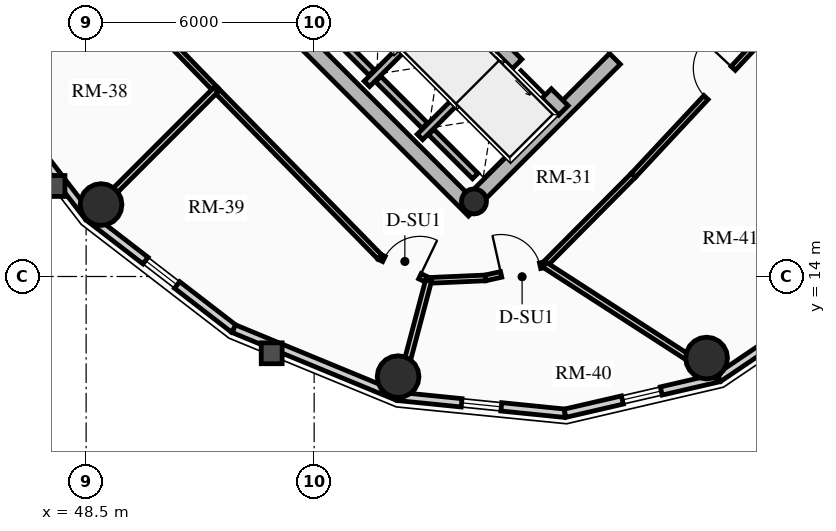
"""IFC4 building model, lengths in metres.
Left out: names, types, materials, properties, quantities, classifications, styles, units other than length and angle.
Written with IfcOpenShell. Run it as: python <this file> out.ifc"""

import sys

from ifc_helpers import new_model, si_unit, direction, frame, frame_2d, origin, origin_2d, place, context, subcontext, project, spatial, rectangle, circle, hollow_circle, extrude, source, transform, mapped, element, fill, save


model = new_model("IFC4")
c1 = context("Model", 3, precision=1e-05, world=origin(), true_north=direction((0.0, 1.0)))
c2 = subcontext(c1, "Body", "Model", "MODEL_VIEW")
j1 = project(units=[si_unit("LENGTHUNIT", "METRE"), si_unit("PLANEANGLEUNIT", "RADIAN")], contexts=[c1])
p1 = place(None, origin())
s1 = spatial("IfcSite", under=j1, at=p1, CompositionType="ELEMENT")
p2 = place(p1, origin())
s2 = spatial("IfcBuilding", under=s1, at=p2, CompositionType="ELEMENT")
p3 = place(p2, frame((0.0, 0.0, 211.21)))
s3 = spatial("IfcBuildingStorey", under=s2, at=p3, CompositionType="ELEMENT", Elevation=211.21)
p4 = place(p3, frame((58.702, 15.732, 0.0), z_axis=(0.0, 0.0, 1.0), x_axis=(-0.707106781187, 0.707106781187, 0.0)))
e1 = element("IfcWall", 1, at=p4, inside=s3, PredefinedType="SHEAR", context=c2, shape_type="SweptSolid", body=[
    extrude(rectangle(XDim=14.1, YDim=0.4, at=frame_2d((7.05, 0.0))), origin(), (0.0, 0.0, 1.0), 2.91),
])
p5 = place(p3, frame((58.561, 15.873, 0.0), z_axis=(0.0, 0.0, 1.0), x_axis=(0.707106781187, 0.707106781187, 0.0)))
e2 = element("IfcWall", 2, at=p5, inside=s3, PredefinedType="SHEAR", context=c2, shape_type="SweptSolid", body=[
    extrude(rectangle(XDim=10.7, YDim=0.4, at=frame_2d((5.35, 0.0))), origin(), (0.0, 0.0, 1.0), 2.91),
])
m1 = source(origin(), c2, "Body", "SweptSolid", [
    extrude(rectangle(XDim=1.5, YDim=2.02, at=frame_2d((0.75, 1.01))), frame((0.0, 0.21, 0.0), z_axis=(0.0, -1.0, 0.0), x_axis=(1.0, 0.0, 0.0)), (0.0, 0.0, 1.0), 0.42),
])
p6 = place(p5, frame((5.45, 0.0, 0.0)))
e3 = element("IfcOpeningElement", 3, at=p6, cuts=e2, PredefinedType="OPENING", context=c2, shape_type="MappedRepresentation", body=[
    mapped(m1, transform((0.0, 0.0, 0.0), x_axis=(1.0, 0.0, 0.0), y_axis=(0.0, 1.0, 0.0), z_axis=(0.0, 0.0, 1.0), scale=1.0)),
])
p7 = place(p3, frame((61.06, 18.373, 0.0), z_axis=(0.0, 0.0, 1.0), x_axis=(-0.707106781187, 0.707106781187, 0.0)))
e4 = element("IfcWall", 4, at=p7, inside=s3, PredefinedType="SHEAR", context=c2, shape_type="SweptSolid", body=[
    extrude(rectangle(XDim=13.7, YDim=0.35, at=frame_2d((6.85, 0.0))), origin(), (0.0, 0.0, 1.0), 2.91),
])
m2 = source(origin(), c2, "Body", "SweptSolid", [
    extrude(rectangle(XDim=1.1, YDim=2.015, at=frame_2d((0.55, 1.007))), frame((0.0, 0.185, 0.0), z_axis=(0.0, -1.0, 0.0), x_axis=(1.0, 0.0, 0.0)), (0.0, 0.0, 1.0), 0.37),
])
p8 = place(p7, frame((4.85, 0.0, 0.0)))
e5 = element("IfcOpeningElement", 5, at=p8, cuts=e4, PredefinedType="OPENING", context=c2, shape_type="MappedRepresentation", body=[
    mapped(m2, transform((0.0, 0.0, 0.0), x_axis=(1.0, 0.0, 0.0), y_axis=(0.0, 1.0, 0.0), z_axis=(0.0, 0.0, 1.0), scale=1.0)),
])
p9 = place(p7, frame((0.625, 0.0, 0.0)))
e6 = element("IfcOpeningElement", 6, at=p9, cuts=e4, PredefinedType="OPENING", context=c2, shape_type="MappedRepresentation", body=[
    mapped(m2, transform((0.0, 0.0, 0.0), x_axis=(1.0, 0.0, 0.0), y_axis=(0.0, 1.0, 0.0), z_axis=(0.0, 0.0, 1.0), scale=1.0)),
])
p10 = place(p7, frame((2.625, 0.0, 0.0)))
e7 = element("IfcOpeningElement", 7, at=p10, cuts=e4, PredefinedType="OPENING", context=c2, shape_type="MappedRepresentation", body=[
    mapped(m2, transform((0.0, 0.0, 0.0), x_axis=(1.0, 0.0, 0.0), y_axis=(0.0, 1.0, 0.0), z_axis=(0.0, 0.0, 1.0), scale=1.0)),
])
m3 = source(origin(), c2, "Body", "SweptSolid", [
    extrude(rectangle(XDim=1.15, YDim=2.02, at=frame_2d((0.575, 1.01))), frame((0.0, 0.185, 0.0), z_axis=(0.0, -1.0, 0.0), x_axis=(1.0, 0.0, 0.0)), (0.0, 0.0, 1.0), 0.37),
])
p11 = place(p7, frame((7.27, 0.0, 0.0)))
e8 = element("IfcOpeningElement", 8, at=p11, cuts=e4, PredefinedType="OPENING", context=c2, shape_type="MappedRepresentation", body=[
    mapped(m3, transform((0.0, 0.0, 0.0), x_axis=(1.0, 0.0, 0.0), y_axis=(0.0, 1.0, 0.0), z_axis=(0.0, 0.0, 1.0), scale=1.0)),
])
p12 = place(p3, frame((58.706, 15.976, 0.0), z_axis=(0.0, 0.0, 1.0), x_axis=(0.707106781187, 0.707106781187, 0.0)))
e9 = element("IfcColumn", 9, at=p12, inside=s3, PredefinedType="COLUMN", context=c2, shape_type="SweptSolid", body=[
    extrude(hollow_circle(Radius=0.33, WallThickness=0.025, at=origin_2d()), origin(), (0.0, 0.0, 1.0), 2.91),
])
for number, where, z_axis, x_axis in (
    (10, (48.893, 15.893, 0.0), (0.0, 0.0, 1.0), (1.0, 0.0, 0.0)),
    (11, (56.709, 11.365, 0.0), (0.0, 0.0, 1.0), (1.0, 0.0, 0.0)),
    (12, (64.827, 11.854, 0.0), (0.0, 0.0, 1.0), (1.0, 0.0, 0.0)),
):
    element("IfcColumn", number, at=place(p3, frame(where, z_axis=z_axis, x_axis=x_axis)), inside=s3, PredefinedType="USERDEFINED", context=c2, shape_type="SweptSolid", body=[
        extrude(circle(Radius=0.55, at=origin_2d()), origin(), (0.0, 0.0, 1.0), 2.91),
    ])
p13 = place(p3, frame((48.569, 15.569, 0.0), z_axis=(0.0, 0.0, 1.0), x_axis=(-0.610523083886, 0.791998462147, 0.0)))
e13 = element("IfcWall", 13, at=p13, inside=s3, PredefinedType="SOLIDWALL", context=c2, shape_type="SweptSolid", body=[
    extrude(rectangle(XDim=4.82, YDim=0.22, at=frame_2d((2.41, 0.0))), origin(), (0.0, 0.0, 1.0), 2.322),
])
p14 = place(p3, frame((52.387, 12.626, 0.0), z_axis=(0.0, 0.0, 1.0), x_axis=(-0.791998462147, 0.610523083886, 0.0)))
e14 = element("IfcWall", 14, at=p14, inside=s3, PredefinedType="SOLIDWALL", context=c2, shape_type="SweptSolid", body=[
    extrude(rectangle(XDim=4.82, YDim=0.22, at=frame_2d((2.41, 0.0))), origin(), (0.0, 0.0, 1.0), 2.322),
])
m4 = source(origin(), c2, "Body", "SweptSolid", [
    extrude(rectangle(XDim=1.05, YDim=1.3, at=frame_2d((0.525, 0.65))), frame((0.0, 0.12, 0.0), z_axis=(0.0, -1.0, 0.0), x_axis=(1.0, 0.0, 0.0)), (0.0, 0.0, 1.0), 0.24),
])
p15 = place(p14, frame((1.885, 0.0, 0.65)))
e15 = element("IfcOpeningElement", 15, at=p15, cuts=e14, PredefinedType="OPENING", context=c2, shape_type="MappedRepresentation", body=[
    mapped(m4, transform((0.0, 0.0, 0.0), x_axis=(1.0, 0.0, 0.0), y_axis=(0.0, 1.0, 0.0), z_axis=(0.0, 0.0, 1.0), scale=1.0)),
])
p16 = place(p3, frame((56.705, 10.845, 0.0), z_axis=(0.0, 0.0, 1.0), x_axis=(-0.924447353237, 0.381309704956, 0.0)))
e16 = element("IfcWall", 16, at=p16, inside=s3, PredefinedType="SOLIDWALL", context=c2, shape_type="SweptSolid", body=[
    extrude(rectangle(XDim=4.671, YDim=0.22, at=frame_2d((2.335, 0.0))), origin(), (0.0, 0.0, 1.0), 2.322),
])
p17 = place(p3, frame((61.1, 10.401, 0.0), z_axis=(0.0, 0.0, 1.0), x_axis=(-0.994929930991, 0.100570534541, 0.0)))
e17 = element("IfcWall", 17, at=p17, inside=s3, PredefinedType="SOLIDWALL", context=c2, shape_type="SweptSolid", body=[
    extrude(rectangle(XDim=4.418, YDim=0.22, at=frame_2d((2.209, 0.0))), origin(), (0.0, 0.0, 1.0), 2.322),
])
p18 = place(p17, frame((1.684, 0.0, 0.65)))
e18 = element("IfcOpeningElement", 18, at=p18, cuts=e17, PredefinedType="OPENING", context=c2, shape_type="MappedRepresentation", body=[
    mapped(m4, transform((0.0, 0.0, 0.0), x_axis=(1.0, 0.0, 0.0), y_axis=(0.0, 1.0, 0.0), z_axis=(0.0, 0.0, 1.0), scale=1.0)),
])
p19 = place(p3, frame((65.144, 11.337, 0.0), z_axis=(0.0, 0.0, 1.0), x_axis=(-0.974249228678, -0.225473813158, 0.0)))
e19 = element("IfcWall", 19, at=p19, inside=s3, PredefinedType="SOLIDWALL", context=c2, shape_type="SweptSolid", body=[
    extrude(rectangle(XDim=4.15, YDim=0.22, at=frame_2d((2.075, 0.0))), origin(), (0.0, 0.0, 1.0), 2.322),
])
p20 = place(p19, frame((1.55, 0.0, 0.65)))
e20 = element("IfcOpeningElement", 20, at=p20, cuts=e19, PredefinedType="OPENING", context=c2, shape_type="MappedRepresentation", body=[
    mapped(m4, transform((0.0, 0.0, 0.0), x_axis=(1.0, 0.0, 0.0), y_axis=(0.0, 1.0, 0.0), z_axis=(0.0, 0.0, 1.0), scale=1.0)),
])
p21 = place(p3, frame((68.439, 13.561, 0.0), z_axis=(0.0, 0.0, 1.0), x_axis=(-0.828833723692, -0.559495003079, 0.0)))
e21 = element("IfcWall", 21, at=p21, inside=s3, PredefinedType="SOLIDWALL", context=c2, shape_type="SweptSolid", body=[
    extrude(rectangle(XDim=3.976, YDim=0.22, at=frame_2d((1.988, 0.0))), origin(), (0.0, 0.0, 1.0), 2.322),
])
p22 = place(p3, frame((55.888, 19.069, 0.0), z_axis=(0.0, 0.0, 1.0), x_axis=(0.707106781187, 0.707106781187, 0.0)))
e22 = element("IfcWall", 22, at=p22, inside=s3, PredefinedType="SHEAR", context=c2, shape_type="SweptSolid", body=[
    extrude(rectangle(XDim=2.97, YDim=0.2, at=frame_2d((1.485, 0.0))), origin(), (0.0, 0.0, 1.0), 2.91),
])
p23 = place(p3, frame((56.015, 19.366, 0.0), z_axis=(0.0, 0.0, 1.0), x_axis=(-0.707106781187, 0.707106781187, 0.0)))
e23 = element("IfcWall", 23, at=p23, inside=s3, PredefinedType="SHEAR", context=c2, shape_type="SweptSolid", body=[
    extrude(rectangle(XDim=2.44, YDim=0.2, at=frame_2d((1.22, 0.0))), origin(), (0.0, 0.0, 1.0), 2.91),
])
p24 = place(p3, frame((57.284, 17.673, 0.0), z_axis=(0.0, 0.0, 1.0), x_axis=(0.707147878904, 0.70706568108, 0.0)))
e24 = element("IfcWall", 24, at=p24, inside=s3, PredefinedType="SHEAR", context=c2, shape_type="SweptSolid", body=[
    extrude(rectangle(XDim=2.97, YDim=0.2, at=frame_2d((1.485, 0.0))), origin(), (0.0, 0.0, 1.0), 2.91),
])
p25 = place(p3, frame((57.412, 17.97, 0.0), z_axis=(0.0, 0.0, 1.0), x_axis=(-0.707106781187, 0.707106781187, 0.0)))
e25 = element("IfcWall", 25, at=p25, inside=s3, PredefinedType="SHEAR", context=c2, shape_type="SweptSolid", body=[
    extrude(rectangle(XDim=1.735, YDim=0.2, at=frame_2d((0.867, 0.0))), origin(), (0.0, 0.0, 1.0), 2.91),
])
p26 = place(p3, frame((58.737, 16.644, 0.0), z_axis=(0.0, 0.0, 1.0), x_axis=(-0.707032117043, 0.707181437447, 0.0)))
e26 = element("IfcWall", 26, at=p26, inside=s3, PredefinedType="SHEAR", context=c2, shape_type="SweptSolid", body=[
    extrude(rectangle(XDim=1.635, YDim=0.2, at=frame_2d((0.817, 0.0))), origin(), (0.0, 0.0, 1.0), 2.91),
])
p27 = place(p3, frame((47.706, 23.253, 0.0), z_axis=(0.0, 0.0, 1.0), x_axis=(0.696179266346, -0.717867974707, 0.0)))
e27 = element("IfcWall", 27, at=p27, inside=s3, PredefinedType="PARTITIONING", context=c2, shape_type="SweptSolid", body=[
    extrude(rectangle(XDim=6.045, YDim=0.15, at=frame_2d((3.022, 0.0))), origin(), (0.0, 0.0, 1.0), 2.255),
])
p28 = place(p3, frame((51.914, 18.914, 0.0), z_axis=(0.0, 0.0, 1.0), x_axis=(0.699999313799, -0.714143515465, 0.0)))
e28 = element("IfcWall", 28, at=p28, inside=s3, PredefinedType="PARTITIONING", context=c2, shape_type="SweptSolid", body=[
    extrude(rectangle(XDim=6.162, YDim=0.15, at=frame_2d((3.081, 0.0))), origin(), (0.0, 0.0, 1.0), 2.255),
])
p29 = place(p3, frame((56.227, 14.513, 0.0), z_axis=(0.0, 0.0, 1.0), x_axis=(0.901477579283, -0.432825801044, 0.0)))
e29 = element("IfcWall", 29, at=p29, inside=s3, PredefinedType="PARTITIONING", context=c2, shape_type="SweptSolid", body=[
    extrude(rectangle(XDim=1.424, YDim=0.15, at=frame_2d((0.712, 0.0))), origin(), (0.0, 0.0, 1.0), 2.255),
])
m5 = source(origin(), c2, "Body", "SweptSolid", [
    extrude(rectangle(XDim=1.05, YDim=2.015, at=frame_2d((0.525, 1.007))), frame((0.0, 0.085, 0.0), z_axis=(0.0, -1.0, 0.0), x_axis=(1.0, 0.0, 0.0)), (0.0, 0.0, 1.0), 0.17),
])
p30 = place(p29, frame((0.12, 0.0, 0.0)))
e30 = element("IfcOpeningElement", 30, at=p30, cuts=e29, PredefinedType="OPENING", context=c2, shape_type="MappedRepresentation", body=[
    mapped(m5, transform((0.0, 0.0, 0.0), x_axis=(1.0, 0.0, 0.0), y_axis=(0.0, 1.0, 0.0), z_axis=(0.0, 0.0, 1.0), scale=1.0)),
])
p31 = place(p3, frame((57.511, 13.897, 0.0), z_axis=(0.0, 0.0, 1.0), x_axis=(0.999024538494, 0.044158481476, 0.0)))
e31 = element("IfcWall", 31, at=p31, inside=s3, PredefinedType="PARTITIONING", context=c2, shape_type="SweptSolid", body=[
    extrude(rectangle(XDim=1.498, YDim=0.15, at=frame_2d((0.749, 0.0))), origin(), (0.0, 0.0, 1.0), 2.322),
])
p32 = place(p3, frame((59.008, 13.963, 0.0), z_axis=(0.0, 0.0, 1.0), x_axis=(0.976020856791, 0.21767702476, 0.0)))
e32 = element("IfcWall", 32, at=p32, inside=s3, PredefinedType="PARTITIONING", context=c2, shape_type="SweptSolid", body=[
    extrude(rectangle(XDim=1.593, YDim=0.15, at=frame_2d((0.796, 0.0))), origin(), (0.0, 0.0, 1.0), 2.255),
])
p33 = place(p32, frame((0.423, 0.0, 0.0)))
e33 = element("IfcOpeningElement", 33, at=p33, cuts=e32, PredefinedType="OPENING", context=c2, shape_type="MappedRepresentation", body=[
    mapped(m5, transform((0.0, 0.0, 0.0), x_axis=(1.0, 0.0, 0.0), y_axis=(0.0, 1.0, 0.0), z_axis=(0.0, 0.0, 1.0), scale=1.0)),
])
p34 = place(p3, frame((60.562, 14.31, 0.0), z_axis=(0.0, 0.0, 1.0), x_axis=(0.704566236161, 0.709638230975, 0.0)))
e34 = element("IfcWall", 34, at=p34, inside=s3, PredefinedType="PARTITIONING", context=c2, shape_type="SweptSolid", body=[
    extrude(rectangle(XDim=3.321, YDim=0.15, at=frame_2d((1.661, 0.0))), origin(), (0.0, 0.0, 1.0), 2.322),
])
p35 = place(p3, frame((62.903, 16.667, 0.0), z_axis=(0.0, 0.0, 1.0), x_axis=(0.682371947497, 0.731005147225, 0.0)))
e35 = element("IfcWall", 35, at=p35, inside=s3, PredefinedType="PARTITIONING", context=c2, shape_type="SweptSolid", body=[
    extrude(rectangle(XDim=6.642, YDim=0.15, at=frame_2d((3.321, 0.0))), origin(), (0.0, 0.0, 1.0), 2.255),
])
p36 = place(p35, frame((2.796, 0.0, 0.0)))
e36 = element("IfcOpeningElement", 36, at=p36, cuts=e35, PredefinedType="OPENING", context=c2, shape_type="MappedRepresentation", body=[
    mapped(m5, transform((0.0, 0.0, 0.0), x_axis=(1.0, 0.0, 0.0), y_axis=(0.0, 1.0, 0.0), z_axis=(0.0, 0.0, 1.0), scale=1.0)),
])
p37 = place(p3, frame((51.914, 18.914, 0.0), z_axis=(0.0, 0.0, 1.0), x_axis=(-0.707106781187, -0.707106781187, 0.0)))
e37 = element("IfcWall", 37, at=p37, inside=s3, PredefinedType="PARTITIONING", context=c2, shape_type="SweptSolid", body=[
    extrude(rectangle(XDim=4.71, YDim=0.16, at=frame_2d((2.355, 0.0))), origin(), (0.0, 0.0, 1.0), 2.322),
])
p38 = place(p3, frame((57.511, 13.897, 0.0), z_axis=(0.0, 0.0, 1.0), x_axis=(-0.256174967125, -0.966630428974, 0.0)))
e38 = element("IfcWall", 38, at=p38, inside=s3, PredefinedType="PARTITIONING", context=c2, shape_type="SweptSolid", body=[
    extrude(rectangle(XDim=3.136, YDim=0.16, at=frame_2d((1.568, 0.0))), origin(), (0.0, 0.0, 1.0), 2.322),
])
p39 = place(p3, frame((60.562, 14.31, 0.0), z_axis=(0.0, 0.0, 1.0), x_axis=(0.839858797161, -0.542804938105, 0.0)))
e39 = element("IfcWall", 39, at=p39, inside=s3, PredefinedType="PARTITIONING", context=c2, shape_type="SweptSolid", body=[
    extrude(rectangle(XDim=5.444, YDim=0.16, at=frame_2d((2.722, 0.0))), origin(), (0.0, 0.0, 1.0), 2.322),
])
p40 = place(p3, frame((47.706, 23.253, 0.0), z_axis=(0.0, 0.0, 1.0), x_axis=(-0.471384756618, -0.881927667799, 0.0)))
e40 = element("IfcWall", 40, at=p40, inside=s3, PredefinedType="PARTITIONING", context=c2, shape_type="SweptSolid", body=[
    extrude(rectangle(XDim=4.374, YDim=0.125, at=frame_2d((2.187, 0.0))), origin(), (0.0, 0.0, 1.0), 2.255),
])
m6 = source(origin(), c2, "Body", "SweptSolid", [
    extrude(rectangle(XDim=0.9, YDim=2.005, at=frame_2d((0.45, 1.002))), frame((0.0, 0.073, 0.0), z_axis=(0.0, -1.0, 0.0), x_axis=(1.0, 0.0, 0.0)), (0.0, 0.0, 1.0), 0.145),
])
p41 = place(p40, frame((1.674, 0.0, 0.0)))
e41 = element("IfcOpeningElement", 41, at=p41, cuts=e40, PredefinedType="OPENING", context=c2, shape_type="MappedRepresentation", body=[
    mapped(m6, transform((0.0, 0.0, 0.0), x_axis=(1.0, 0.0, 0.0), y_axis=(0.0, 1.0, 0.0), z_axis=(0.0, 0.0, 1.0), scale=1.0)),
])
m7 = source(origin(), c2, "Body", "SweptSolid", [
    extrude(rectangle(XDim=1.05, YDim=1.3, at=frame_2d((0.525, 0.65))), frame((0.0, 0.03, 0.0), z_axis=(0.0, -1.0, 0.0), x_axis=(1.0, 0.0, 0.0)), (0.0, 0.0, 1.0), 0.06),
])
p42 = place(p15, origin())
e42 = element("IfcWindow", 42, at=p42, inside=s3, PartitioningType="SINGLE_PANEL", PredefinedType="WINDOW", context=c2, shape_type="MappedRepresentation", body=[
    mapped(m7, transform((0.0, 0.0, 0.0), x_axis=(1.0, 0.0, 0.0), y_axis=(0.0, 1.0, 0.0), z_axis=(0.0, 0.0, 1.0), scale=1.0)),
])
fill(e15, e42)
p43 = place(p18, origin())
e43 = element("IfcWindow", 43, at=p43, inside=s3, PartitioningType="SINGLE_PANEL", PredefinedType="WINDOW", context=c2, shape_type="MappedRepresentation", body=[
    mapped(m7, transform((0.0, 0.0, 0.0), x_axis=(1.0, 0.0, 0.0), y_axis=(0.0, 1.0, 0.0), z_axis=(0.0, 0.0, 1.0), scale=1.0)),
])
fill(e18, e43)
p44 = place(p20, origin())
e44 = element("IfcWindow", 44, at=p44, inside=s3, PartitioningType="SINGLE_PANEL", PredefinedType="WINDOW", context=c2, shape_type="MappedRepresentation", body=[
    mapped(m7, transform((0.0, 0.0, 0.0), x_axis=(1.0, 0.0, 0.0), y_axis=(0.0, 1.0, 0.0), z_axis=(0.0, 0.0, 1.0), scale=1.0)),
])
fill(e20, e44)
m8 = source(origin(), c2, "Body", "SweptSolid", [
    extrude(rectangle(XDim=1.1, YDim=2.015, at=frame_2d((0.55, 1.007))), frame((0.0, 0.025, 0.0), z_axis=(0.0, -1.0, 0.0), x_axis=(1.0, 0.0, 0.0)), (0.0, 0.0, 1.0), 0.05),
])
p45 = place(p9, origin())
e45 = element("IfcDoor", 45, at=p45, inside=s3, OperationType="SLIDING_TO_LEFT", PredefinedType="DOOR", context=c2, shape_type="MappedRepresentation", body=[
    mapped(m8, transform((0.0, 0.0, 0.0), x_axis=(1.0, 0.0, 0.0), y_axis=(0.0, 1.0, 0.0), z_axis=(0.0, 0.0, 1.0), scale=1.0)),
])
fill(e6, e45)
m9 = source(origin(), c2, "Body", "SweptSolid", [
    extrude(rectangle(XDim=1.5, YDim=2.02, at=frame_2d((0.75, 1.01))), frame((0.0, 0.025, 0.0), z_axis=(0.0, -1.0, 0.0), x_axis=(1.0, 0.0, 0.0)), (0.0, 0.0, 1.0), 0.05),
])
p46 = place(p6, origin())
e46 = element("IfcDoor", 46, at=p46, inside=s3, OperationType="DOUBLE_DOOR_SINGLE_SWING", PredefinedType="DOOR", context=c2, shape_type="MappedRepresentation", body=[
    mapped(m9, transform((0.0, 0.0, 0.0), x_axis=(1.0, 0.0, 0.0), y_axis=(0.0, 1.0, 0.0), z_axis=(0.0, 0.0, 1.0), scale=1.0)),
])
fill(e3, e46)
m10 = source(origin(), c2, "Body", "SweptSolid", [
    extrude(rectangle(XDim=1.05, YDim=2.015, at=frame_2d((0.525, 1.007))), frame((0.0, 0.025, 0.0), z_axis=(0.0, -1.0, 0.0), x_axis=(1.0, 0.0, 0.0)), (0.0, 0.0, 1.0), 0.05),
])
p47 = place(p30, origin())
e47 = element("IfcDoor", 47, at=p47, inside=s3, OperationType="SINGLE_SWING_RIGHT", PredefinedType="DOOR", context=c2, shape_type="MappedRepresentation", body=[
    mapped(m10, transform((0.0, 0.0, 0.0), x_axis=(1.0, 0.0, 0.0), y_axis=(0.0, 1.0, 0.0), z_axis=(0.0, 0.0, 1.0), scale=1.0)),
])
fill(e30, e47)
p48 = place(p33, origin())
e48 = element("IfcDoor", 48, at=p48, inside=s3, OperationType="SINGLE_SWING_LEFT", PredefinedType="DOOR", context=c2, shape_type="MappedRepresentation", body=[
    mapped(m10, transform((0.0, 0.0, 0.0), x_axis=(1.0, 0.0, 0.0), y_axis=(0.0, 1.0, 0.0), z_axis=(0.0, 0.0, 1.0), scale=1.0)),
])
fill(e33, e48)
p49 = place(p36, origin())
e49 = element("IfcDoor", 49, at=p49, inside=s3, OperationType="SINGLE_SWING_RIGHT", PredefinedType="DOOR", context=c2, shape_type="MappedRepresentation", body=[
    mapped(m10, transform((0.0, 0.0, 0.0), x_axis=(1.0, 0.0, 0.0), y_axis=(0.0, 1.0, 0.0), z_axis=(0.0, 0.0, 1.0), scale=1.0)),
])
fill(e36, e49)
save(model, sys.argv[1])
